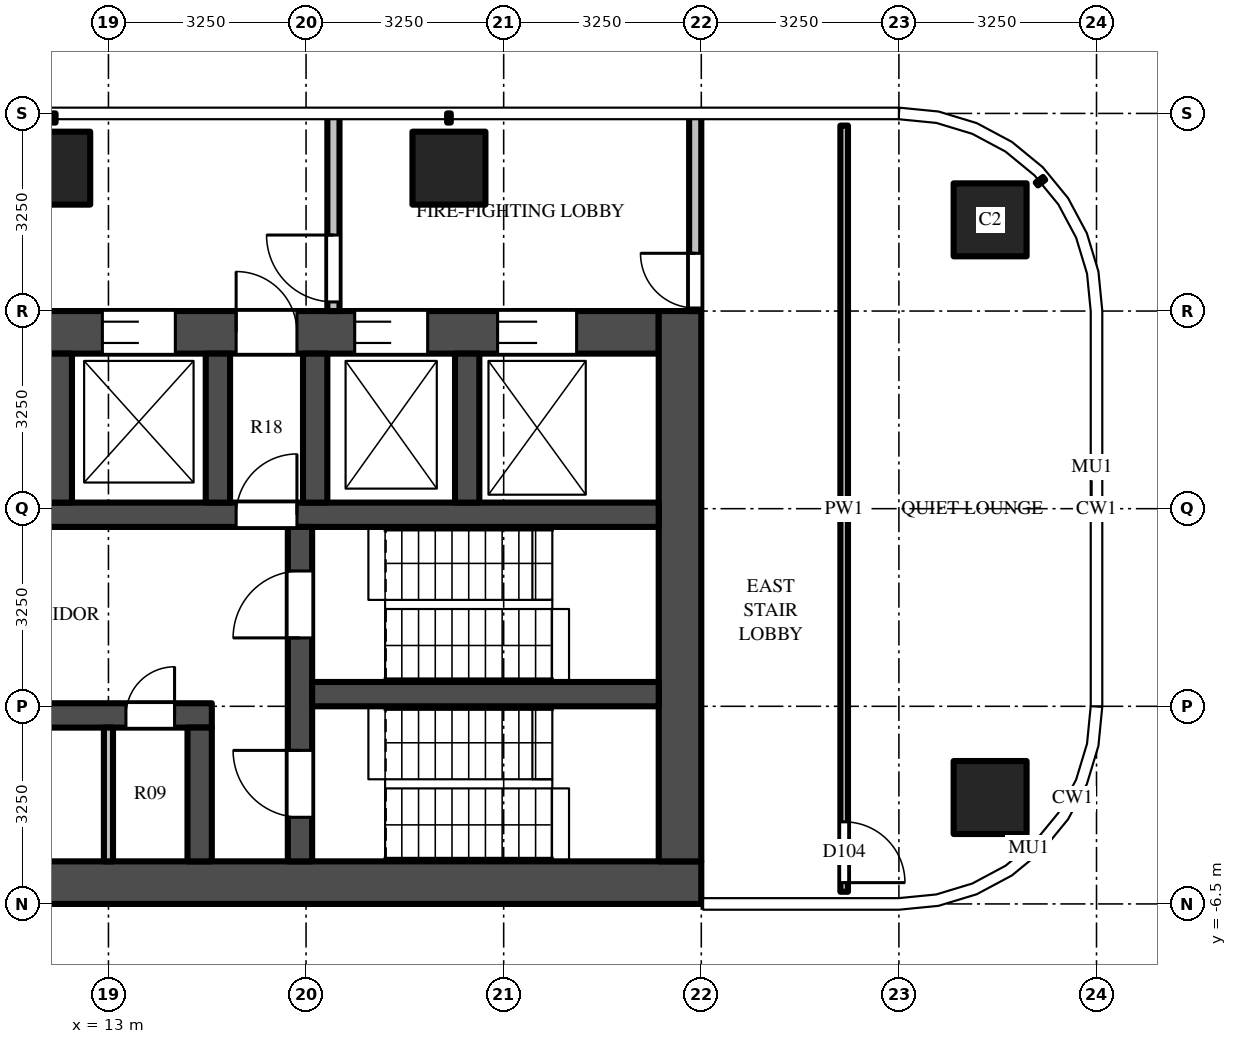
"""IFC4 building model, lengths in metres.
Left out: names, types, materials, properties, quantities, classifications, styles, units other than length and angle.
Written with IfcOpenShell. Run it as: python <this file> out.ifc"""

import sys

from ifc_helpers import new_model, si_unit, direction, frame, frame_2d, origin, origin_2d, place, context, subcontext, project, spatial, rectangle, extrude, source, transform, mapped, element, fill, save


model = new_model("IFC4")
c1 = context("Model", 3, precision=1e-05, world=origin(), true_north=direction((0.0, 1.0)))
c2 = subcontext(c1, "Body", "Model", "MODEL_VIEW")
j1 = project(units=[si_unit("LENGTHUNIT", "METRE"), si_unit("PLANEANGLEUNIT", "RADIAN")], contexts=[c1])
p1 = place(None, origin())
s1 = spatial("IfcSite", under=j1, at=p1, CompositionType="ELEMENT")
p2 = place(p1, origin())
s2 = spatial("IfcBuilding", under=s1, at=p2, CompositionType="ELEMENT")
p3 = place(p2, frame((0.0, 0.0, 169.8)))
s3 = spatial("IfcBuildingStorey", under=s2, at=p3, CompositionType="ELEMENT", Elevation=169.8)
m1 = source(origin(), c2, "Body", "SweptSolid", [
    extrude(rectangle(XDim=1.2, YDim=1.2, at=origin_2d()), origin(), (0.0, 0.0, 1.0), 3.9),
])
for number, where, z_axis, x_axis in (
    (1, (12.1, 5.6, 0.0), (0.0, 0.0, 1.0), (1.0, 0.0, 0.0)),
    (2, (18.6, 5.6, 0.0), (0.0, 0.0, 1.0), (1.0, 0.0, 0.0)),
    (3, (27.5, 4.75, 0.0), (0.0, 0.0, 1.0), (1.0, 0.0, 0.0)),
    (4, (27.5, -4.75, 0.0), (0.0, 0.0, 1.0), (1.0, 0.0, 0.0)),
):
    element("IfcColumn", number, at=place(p3, frame(where, z_axis=z_axis, x_axis=x_axis)), inside=s3, PredefinedType="COLUMN", context=c2, shape_type="MappedRepresentation", body=[
        mapped(m1, transform((0.0, 0.0, 0.0))),
    ])
m2 = source(origin(), c2, "Body", "SweptSolid", [
    extrude(rectangle(XDim=16.55, YDim=0.7, at=frame_2d((8.275, 0.0))), origin(), (0.0, 0.0, 1.0), 3.7),
])
p4 = place(p3, frame((6.2, -6.15, 0.0), z_axis=(0.0, 0.0, 1.0), x_axis=(1.0, 0.0, 0.0)))
e5 = element("IfcWall", 5, at=p4, inside=s3, PredefinedType="SHEAR", context=c2, shape_type="MappedRepresentation", body=[
    mapped(m2, transform((0.0, 0.0, 0.0))),
])
m3 = source(origin(), c2, "Body", "SweptSolid", [
    extrude(rectangle(XDim=14.85, YDim=0.7, at=frame_2d((7.425, 0.0))), origin(), (0.0, 0.0, 1.0), 3.7),
])
p5 = place(p3, frame((7.2, 2.9, 0.0), z_axis=(0.0, 0.0, 1.0), x_axis=(1.0, 0.0, 0.0)))
e6 = element("IfcWall", 6, at=p5, inside=s3, PredefinedType="SHEAR", context=c2, shape_type="MappedRepresentation", body=[
    mapped(m3, transform((0.0, 0.0, 0.0))),
])
m4 = source(origin(), c2, "Body", "SweptSolid", [
    extrude(rectangle(XDim=1.1, YDim=2.1, at=frame_2d((0.55, 1.05))), frame((0.0, 0.36, 0.0), z_axis=(0.0, -1.0, 0.0), x_axis=(1.0, 0.0, 0.0)), (0.0, 0.0, 1.0), 0.72),
])
p6 = place(p5, frame((0.55, 0.0, 0.0)))
e7 = element("IfcOpeningElement", 7, at=p6, cuts=e6, PredefinedType="OPENING", context=c2, shape_type="MappedRepresentation", body=[
    mapped(m4, transform((0.0, 0.0, 0.0))),
])
p7 = place(p5, frame((3.15, 0.0, 0.0)))
e8 = element("IfcOpeningElement", 8, at=p7, cuts=e6, PredefinedType="OPENING", context=c2, shape_type="MappedRepresentation", body=[
    mapped(m4, transform((0.0, 0.0, 0.0))),
])
m5 = source(origin(), c2, "Body", "SweptSolid", [
    extrude(rectangle(XDim=1.2, YDim=2.1, at=frame_2d((0.6, 1.05))), frame((0.0, 0.36, 0.0), z_axis=(0.0, -1.0, 0.0), x_axis=(1.0, 0.0, 0.0)), (0.0, 0.0, 1.0), 0.72),
])
p8 = place(p5, frame((5.7, 0.0, 0.0)))
e9 = element("IfcOpeningElement", 9, at=p8, cuts=e6, PredefinedType="OPENING", context=c2, shape_type="MappedRepresentation", body=[
    mapped(m5, transform((0.0, 0.0, 0.0))),
])
m6 = source(origin(), c2, "Body", "SweptSolid", [
    extrude(rectangle(XDim=1.3, YDim=2.1, at=frame_2d((0.65, 1.05))), frame((0.0, 0.36, 0.0), z_axis=(0.0, -1.0, 0.0), x_axis=(1.0, 0.0, 0.0)), (0.0, 0.0, 1.0), 0.72),
])
p9 = place(p5, frame((12.2, 0.0, 0.0)))
e10 = element("IfcOpeningElement", 10, at=p9, cuts=e6, PredefinedType="OPENING", context=c2, shape_type="MappedRepresentation", body=[
    mapped(m6, transform((0.0, 0.0, 0.0))),
])
p10 = place(p5, frame((9.85, 0.0, 0.0)))
e11 = element("IfcOpeningElement", 11, at=p10, cuts=e6, PredefinedType="OPENING", context=c2, shape_type="MappedRepresentation", body=[
    mapped(m5, transform((0.0, 0.0, 0.0))),
])
m7 = source(origin(), c2, "Body", "SweptSolid", [
    extrude(rectangle(XDim=1.0, YDim=2.1, at=frame_2d((0.5, 1.05))), frame((0.0, 0.36, 0.0), z_axis=(0.0, -1.0, 0.0), x_axis=(1.0, 0.0, 0.0)), (0.0, 0.0, 1.0), 0.72),
])
p11 = place(p5, frame((7.9, 0.0, 0.0)))
e12 = element("IfcOpeningElement", 12, at=p11, cuts=e6, PredefinedType="OPENING", context=c2, shape_type="MappedRepresentation", body=[
    mapped(m7, transform((0.0, 0.0, 0.0))),
])
m8 = source(origin(), c2, "Body", "SweptSolid", [
    extrude(rectangle(XDim=9.05, YDim=0.7, at=frame_2d((4.525, 0.0))), origin(), (0.0, 0.0, 1.0), 3.7),
])
p12 = place(p3, frame((22.4, -5.8, 0.0), z_axis=(0.0, 0.0, 1.0), x_axis=(0.0, 1.0, 0.0)))
e13 = element("IfcWall", 13, at=p12, inside=s3, PredefinedType="SHEAR", context=c2, shape_type="MappedRepresentation", body=[
    mapped(m8, transform((0.0, 0.0, 0.0))),
])
m9 = source(origin(), c2, "Body", "SweptSolid", [
    extrude(rectangle(XDim=7.5, YDim=0.4, at=frame_2d((3.75, 0.0))), origin(), (0.0, 0.0, 1.0), 3.7),
])
p13 = place(p3, frame((7.2, -3.4, 0.0), z_axis=(0.0, 0.0, 1.0), x_axis=(1.0, 0.0, 0.0)))
e14 = element("IfcWall", 14, at=p13, inside=s3, PredefinedType="SHEAR", context=c2, shape_type="MappedRepresentation", body=[
    mapped(m9, transform((0.0, 0.0, 0.0))),
])
m10 = source(origin(), c2, "Body", "SweptSolid", [
    extrude(rectangle(XDim=1.0, YDim=2.1, at=frame_2d((0.5, 1.05))), frame((0.0, 0.21, 0.0), z_axis=(0.0, -1.0, 0.0), x_axis=(1.0, 0.0, 0.0)), (0.0, 0.0, 1.0), 0.42),
])
p14 = place(p13, frame((2.363, 0.0, 0.0)))
e15 = element("IfcOpeningElement", 15, at=p14, cuts=e14, PredefinedType="OPENING", context=c2, shape_type="MappedRepresentation", body=[
    mapped(m10, transform((0.0, 0.0, 0.0))),
])
m11 = source(origin(), c2, "Body", "SweptSolid", [
    extrude(rectangle(XDim=0.8, YDim=2.1, at=frame_2d((0.4, 1.05))), frame((0.0, 0.21, 0.0), z_axis=(0.0, -1.0, 0.0), x_axis=(1.0, 0.0, 0.0)), (0.0, 0.0, 1.0), 0.42),
])
p15 = place(p13, frame((6.087, 0.0, 0.0)))
e16 = element("IfcOpeningElement", 16, at=p15, cuts=e14, PredefinedType="OPENING", context=c2, shape_type="MappedRepresentation", body=[
    mapped(m11, transform((0.0, 0.0, 0.0))),
])
m12 = source(origin(), c2, "Body", "SweptSolid", [
    extrude(rectangle(XDim=14.85, YDim=0.4, at=frame_2d((7.425, 0.0))), origin(), (0.0, 0.0, 1.0), 3.7),
])
p16 = place(p3, frame((7.2, -0.1, 0.0), z_axis=(0.0, 0.0, 1.0), x_axis=(1.0, 0.0, 0.0)))
e17 = element("IfcWall", 17, at=p16, inside=s3, PredefinedType="SHEAR", context=c2, shape_type="MappedRepresentation", body=[
    mapped(m12, transform((0.0, 0.0, 0.0))),
])
p17 = place(p16, frame((7.9, 0.0, 0.0)))
e18 = element("IfcOpeningElement", 18, at=p17, cuts=e17, PredefinedType="OPENING", context=c2, shape_type="MappedRepresentation", body=[
    mapped(m10, transform((0.0, 0.0, 0.0))),
])
m13 = source(origin(), c2, "Body", "SweptSolid", [
    extrude(rectangle(XDim=5.5, YDim=0.4, at=frame_2d((2.75, 0.0))), origin(), (0.0, 0.0, 1.0), 3.7),
])
p18 = place(p3, frame((16.15, -5.8, 0.0), z_axis=(0.0, 0.0, 1.0), x_axis=(0.0, 1.0, 0.0)))
e19 = element("IfcWall", 19, at=p18, inside=s3, PredefinedType="SHEAR", context=c2, shape_type="MappedRepresentation", body=[
    mapped(m13, transform((0.0, 0.0, 0.0))),
])
m14 = source(origin(), c2, "Body", "SweptSolid", [
    extrude(rectangle(XDim=1.1, YDim=2.1, at=frame_2d((0.55, 1.05))), frame((0.0, 0.21, 0.0), z_axis=(0.0, -1.0, 0.0), x_axis=(1.0, 0.0, 0.0)), (0.0, 0.0, 1.0), 0.42),
])
p19 = place(p18, frame((0.725, 0.0, 0.0)))
e20 = element("IfcOpeningElement", 20, at=p19, cuts=e19, PredefinedType="OPENING", context=c2, shape_type="MappedRepresentation", body=[
    mapped(m14, transform((0.0, 0.0, 0.0))),
])
p20 = place(p18, frame((3.675, 0.0, 0.0)))
e21 = element("IfcOpeningElement", 21, at=p20, cuts=e19, PredefinedType="OPENING", context=c2, shape_type="MappedRepresentation", body=[
    mapped(m14, transform((0.0, 0.0, 0.0))),
])
m15 = source(origin(), c2, "Body", "SweptSolid", [
    extrude(rectangle(XDim=5.7, YDim=0.4, at=frame_2d((2.85, 0.0))), origin(), (0.0, 0.0, 1.0), 3.7),
])
p21 = place(p3, frame((16.35, -3.05, 0.0), z_axis=(0.0, 0.0, 1.0), x_axis=(1.0, 0.0, 0.0)))
e22 = element("IfcWall", 22, at=p21, inside=s3, PredefinedType="SHEAR", context=c2, shape_type="MappedRepresentation", body=[
    mapped(m15, transform((0.0, 0.0, 0.0))),
])
m16 = source(origin(), c2, "Body", "SweptSolid", [
    extrude(rectangle(XDim=2.2, YDim=0.4, at=frame_2d((1.1, 0.0))), origin(), (0.0, 0.0, 1.0), 3.7),
])
p22 = place(p3, frame((14.5, -5.8, 0.0), z_axis=(0.0, 0.0, 1.0), x_axis=(0.0, 1.0, 0.0)))
e23 = element("IfcWall", 23, at=p22, inside=s3, PredefinedType="SHEAR", context=c2, shape_type="MappedRepresentation", body=[
    mapped(m16, transform((0.0, 0.0, 0.0))),
])
m17 = source(origin(), c2, "Body", "SweptSolid", [
    extrude(rectangle(XDim=2.45, YDim=0.4, at=frame_2d((1.225, 0.0))), origin(), (0.0, 0.0, 1.0), 3.7),
])
for number, where, z_axis, x_axis in (
    (24, (12.2, 0.1, 0.0), (0.0, 0.0, 1.0), (0.0, 1.0, 0.0)),
    (25, (14.8, 0.1, 0.0), (0.0, 0.0, 1.0), (0.0, 1.0, 0.0)),
    (26, (16.4, 0.1, 0.0), (0.0, 0.0, 1.0), (0.0, 1.0, 0.0)),
    (27, (18.9, 0.1, 0.0), (0.0, 0.0, 1.0), (0.0, 1.0, 0.0)),
):
    element("IfcWall", number, at=place(p3, frame(where, z_axis=z_axis, x_axis=x_axis)), inside=s3, PredefinedType="SHEAR", context=c2, shape_type="MappedRepresentation", body=[
        mapped(m17, transform((0.0, 0.0, 0.0))),
    ])
m18 = source(origin(), c2, "Body", "SweptSolid", [
    extrude(rectangle(XDim=3.25, YDim=0.2, at=frame_2d((1.625, 0.0))), origin(), (0.0, 0.0, 1.0), 3.7),
])
p23 = place(p3, frame((16.7, 3.25, 0.0), z_axis=(0.0, 0.0, 1.0), x_axis=(0.0, 1.0, 0.0)))
e28 = element("IfcWall", 28, at=p23, inside=s3, PredefinedType="PARTITIONING", context=c2, shape_type="MappedRepresentation", body=[
    mapped(m18, transform((0.0, 0.0, 0.0))),
])
m19 = source(origin(), c2, "Body", "SweptSolid", [
    extrude(rectangle(XDim=1.1, YDim=2.1, at=frame_2d((0.55, 1.05))), frame((0.0, 0.11, 0.0), z_axis=(0.0, -1.0, 0.0), x_axis=(1.0, 0.0, 0.0)), (0.0, 0.0, 1.0), 0.22),
])
p24 = place(p23, frame((0.15, 0.0, 0.0)))
e29 = element("IfcOpeningElement", 29, at=p24, cuts=e28, PredefinedType="OPENING", context=c2, shape_type="MappedRepresentation", body=[
    mapped(m19, transform((0.0, 0.0, 0.0))),
])
p25 = place(p3, frame((22.65, 3.25, 0.0), z_axis=(0.0, 0.0, 1.0), x_axis=(0.0, 1.0, 0.0)))
e30 = element("IfcWall", 30, at=p25, inside=s3, PredefinedType="PARTITIONING", context=c2, shape_type="MappedRepresentation", body=[
    mapped(m18, transform((0.0, 0.0, 0.0))),
])
m20 = source(origin(), c2, "Body", "SweptSolid", [
    extrude(rectangle(XDim=0.9, YDim=2.1, at=frame_2d((0.45, 1.05))), frame((0.0, 0.11, 0.0), z_axis=(0.0, -1.0, 0.0), x_axis=(1.0, 0.0, 0.0)), (0.0, 0.0, 1.0), 0.22),
])
p26 = place(p25, frame((0.05, 0.0, 0.0)))
e31 = element("IfcOpeningElement", 31, at=p26, cuts=e30, PredefinedType="OPENING", context=c2, shape_type="MappedRepresentation", body=[
    mapped(m20, transform((0.0, 0.0, 0.0))),
])
m21 = source(origin(), c2, "Body", "SweptSolid", [
    extrude(rectangle(XDim=2.2, YDim=0.15, at=frame_2d((1.1, 0.0))), origin(), (0.0, 0.0, 1.0), 3.7),
])
p27 = place(p3, frame((13.0, -5.8, 0.0), z_axis=(0.0, 0.0, 1.0), x_axis=(0.0, 1.0, 0.0)))
e32 = element("IfcWall", 32, at=p27, inside=s3, PredefinedType="PARTITIONING", context=c2, shape_type="MappedRepresentation", body=[
    mapped(m21, transform((0.0, 0.0, 0.0))),
])
m22 = source(origin(), c2, "Body", "SweptSolid", [
    extrude(rectangle(XDim=12.6, YDim=0.125, at=frame_2d((6.3, 0.0))), origin(), (0.0, 0.0, 1.0), 2.78),
])
p28 = place(p3, frame((25.1, 6.3, 0.0), z_axis=(0.0, 0.0, 1.0), x_axis=(0.0, -1.0, 0.0)))
e33 = element("IfcWall", 33, at=p28, inside=s3, PredefinedType="PARTITIONING", context=c2, shape_type="MappedRepresentation", body=[
    mapped(m22, transform((0.0, 0.0, 0.0))),
])
m23 = source(origin(), c2, "Body", "SweptSolid", [
    extrude(rectangle(XDim=1.0, YDim=2.1, at=frame_2d((0.5, 1.05))), frame((0.0, 0.073, 0.0), z_axis=(0.0, -1.0, 0.0), x_axis=(1.0, 0.0, 0.0)), (0.0, 0.0, 1.0), 0.145),
])
p29 = place(p28, frame((11.45, 0.0, 0.0)))
e34 = element("IfcOpeningElement", 34, at=p29, cuts=e33, PredefinedType="OPENING", context=c2, shape_type="MappedRepresentation", body=[
    mapped(m23, transform((0.0, 0.0, 0.0))),
])
m24 = source(origin(), c2, "Body", "SweptSolid", [
    extrude(rectangle(XDim=1.2, YDim=2.1, at=frame_2d((0.6, 1.05))), frame((0.0, -0.275, 0.0), z_axis=(0.0, -1.0, 0.0), x_axis=(1.0, 0.0, 0.0)), (0.0, 0.0, 1.0), 0.05),
])
p30 = place(p8, origin())
e35 = element("IfcDoor", 35, at=p30, inside=s3, OperationType="DOUBLE_DOOR_SLIDING", PredefinedType="DOOR", context=c2, shape_type="MappedRepresentation", body=[
    mapped(m24, transform((0.0, 0.0, 0.0))),
])
fill(e9, e35)
m25 = source(origin(), c2, "Body", "SweptSolid", [
    extrude(rectangle(XDim=1.3, YDim=2.1, at=frame_2d((0.65, 1.05))), frame((0.0, -0.275, 0.0), z_axis=(0.0, -1.0, 0.0), x_axis=(1.0, 0.0, 0.0)), (0.0, 0.0, 1.0), 0.05),
])
p31 = place(p9, origin())
e36 = element("IfcDoor", 36, at=p31, inside=s3, OperationType="DOUBLE_DOOR_SLIDING", PredefinedType="DOOR", context=c2, shape_type="MappedRepresentation", body=[
    mapped(m25, transform((0.0, 0.0, 0.0))),
])
fill(e10, e36)
p32 = place(p10, origin())
e37 = element("IfcDoor", 37, at=p32, inside=s3, OperationType="DOUBLE_DOOR_SLIDING", PredefinedType="DOOR", context=c2, shape_type="MappedRepresentation", body=[
    mapped(m24, transform((0.0, 0.0, 0.0))),
])
fill(e11, e37)
m26 = source(origin(), c2, "Body", "SweptSolid", [
    extrude(rectangle(XDim=1.1, YDim=2.1, at=frame_2d((0.55, 1.05))), frame((0.0, 0.025, 0.0), z_axis=(0.0, -1.0, 0.0), x_axis=(1.0, 0.0, 0.0)), (0.0, 0.0, 1.0), 0.05),
])
p33 = place(p19, origin())
e38 = element("IfcDoor", 38, at=p33, inside=s3, OperationType="SINGLE_SWING_RIGHT", PredefinedType="DOOR", context=c2, shape_type="MappedRepresentation", body=[
    mapped(m26, transform((0.0, 0.0, 0.0))),
])
fill(e20, e38)
p34 = place(p20, origin())
e39 = element("IfcDoor", 39, at=p34, inside=s3, OperationType="SINGLE_SWING_LEFT", PredefinedType="DOOR", context=c2, shape_type="MappedRepresentation", body=[
    mapped(m26, transform((0.0, 0.0, 0.0))),
])
fill(e21, e39)
m27 = source(origin(), c2, "Body", "SweptSolid", [
    extrude(rectangle(XDim=1.0, YDim=2.1, at=frame_2d((0.5, 1.05))), frame((0.0, 0.025, 0.0), z_axis=(0.0, -1.0, 0.0), x_axis=(1.0, 0.0, 0.0)), (0.0, 0.0, 1.0), 0.05),
])
p35 = place(p17, origin())
e40 = element("IfcDoor", 40, at=p35, inside=s3, OperationType="SINGLE_SWING_RIGHT", PredefinedType="DOOR", context=c2, shape_type="MappedRepresentation", body=[
    mapped(m27, transform((0.0, 0.0, 0.0))),
])
fill(e18, e40)
m28 = source(origin(), c2, "Body", "SweptSolid", [
    extrude(rectangle(XDim=1.0, YDim=2.1, at=frame_2d((0.5, 1.05))), frame((0.0, -0.275, 0.0), z_axis=(0.0, -1.0, 0.0), x_axis=(1.0, 0.0, 0.0)), (0.0, 0.0, 1.0), 0.05),
])
p36 = place(p11, origin())
e41 = element("IfcDoor", 41, at=p36, inside=s3, OperationType="SINGLE_SWING_LEFT", PredefinedType="DOOR", context=c2, shape_type="MappedRepresentation", body=[
    mapped(m28, transform((0.0, 0.0, 0.0))),
])
fill(e12, e41)
p37 = place(p24, origin())
e42 = element("IfcDoor", 42, at=p37, inside=s3, OperationType="SINGLE_SWING_RIGHT", PredefinedType="DOOR", context=c2, shape_type="MappedRepresentation", body=[
    mapped(m26, transform((0.0, 0.0, 0.0))),
])
fill(e29, e42)
m29 = source(origin(), c2, "Body", "SweptSolid", [
    extrude(rectangle(XDim=0.9, YDim=2.1, at=frame_2d((0.45, 1.05))), frame((0.0, 0.025, 0.0), z_axis=(0.0, -1.0, 0.0), x_axis=(1.0, 0.0, 0.0)), (0.0, 0.0, 1.0), 0.05),
])
p38 = place(p26, origin())
e43 = element("IfcDoor", 43, at=p38, inside=s3, OperationType="SINGLE_SWING_RIGHT", PredefinedType="DOOR", context=c2, shape_type="MappedRepresentation", body=[
    mapped(m29, transform((0.0, 0.0, 0.0))),
])
fill(e31, e43)
m30 = source(origin(), c2, "Body", "SweptSolid", [
    extrude(rectangle(XDim=0.8, YDim=2.1, at=frame_2d((0.4, 1.05))), frame((0.0, 0.025, 0.0), z_axis=(0.0, -1.0, 0.0), x_axis=(1.0, 0.0, 0.0)), (0.0, 0.0, 1.0), 0.05),
])
p39 = place(p15, origin())
e44 = element("IfcDoor", 44, at=p39, inside=s3, OperationType="SINGLE_SWING_RIGHT", PredefinedType="DOOR", context=c2, shape_type="MappedRepresentation", body=[
    mapped(m30, transform((0.0, 0.0, 0.0))),
])
fill(e16, e44)
p40 = place(p29, origin())
e45 = element("IfcDoor", 45, at=p40, inside=s3, OperationType="SINGLE_SWING_RIGHT", PredefinedType="DOOR", context=c2, shape_type="MappedRepresentation", body=[
    mapped(m27, transform((0.0, 0.0, 0.0))),
])
fill(e34, e45)
save(model, sys.argv[1])
